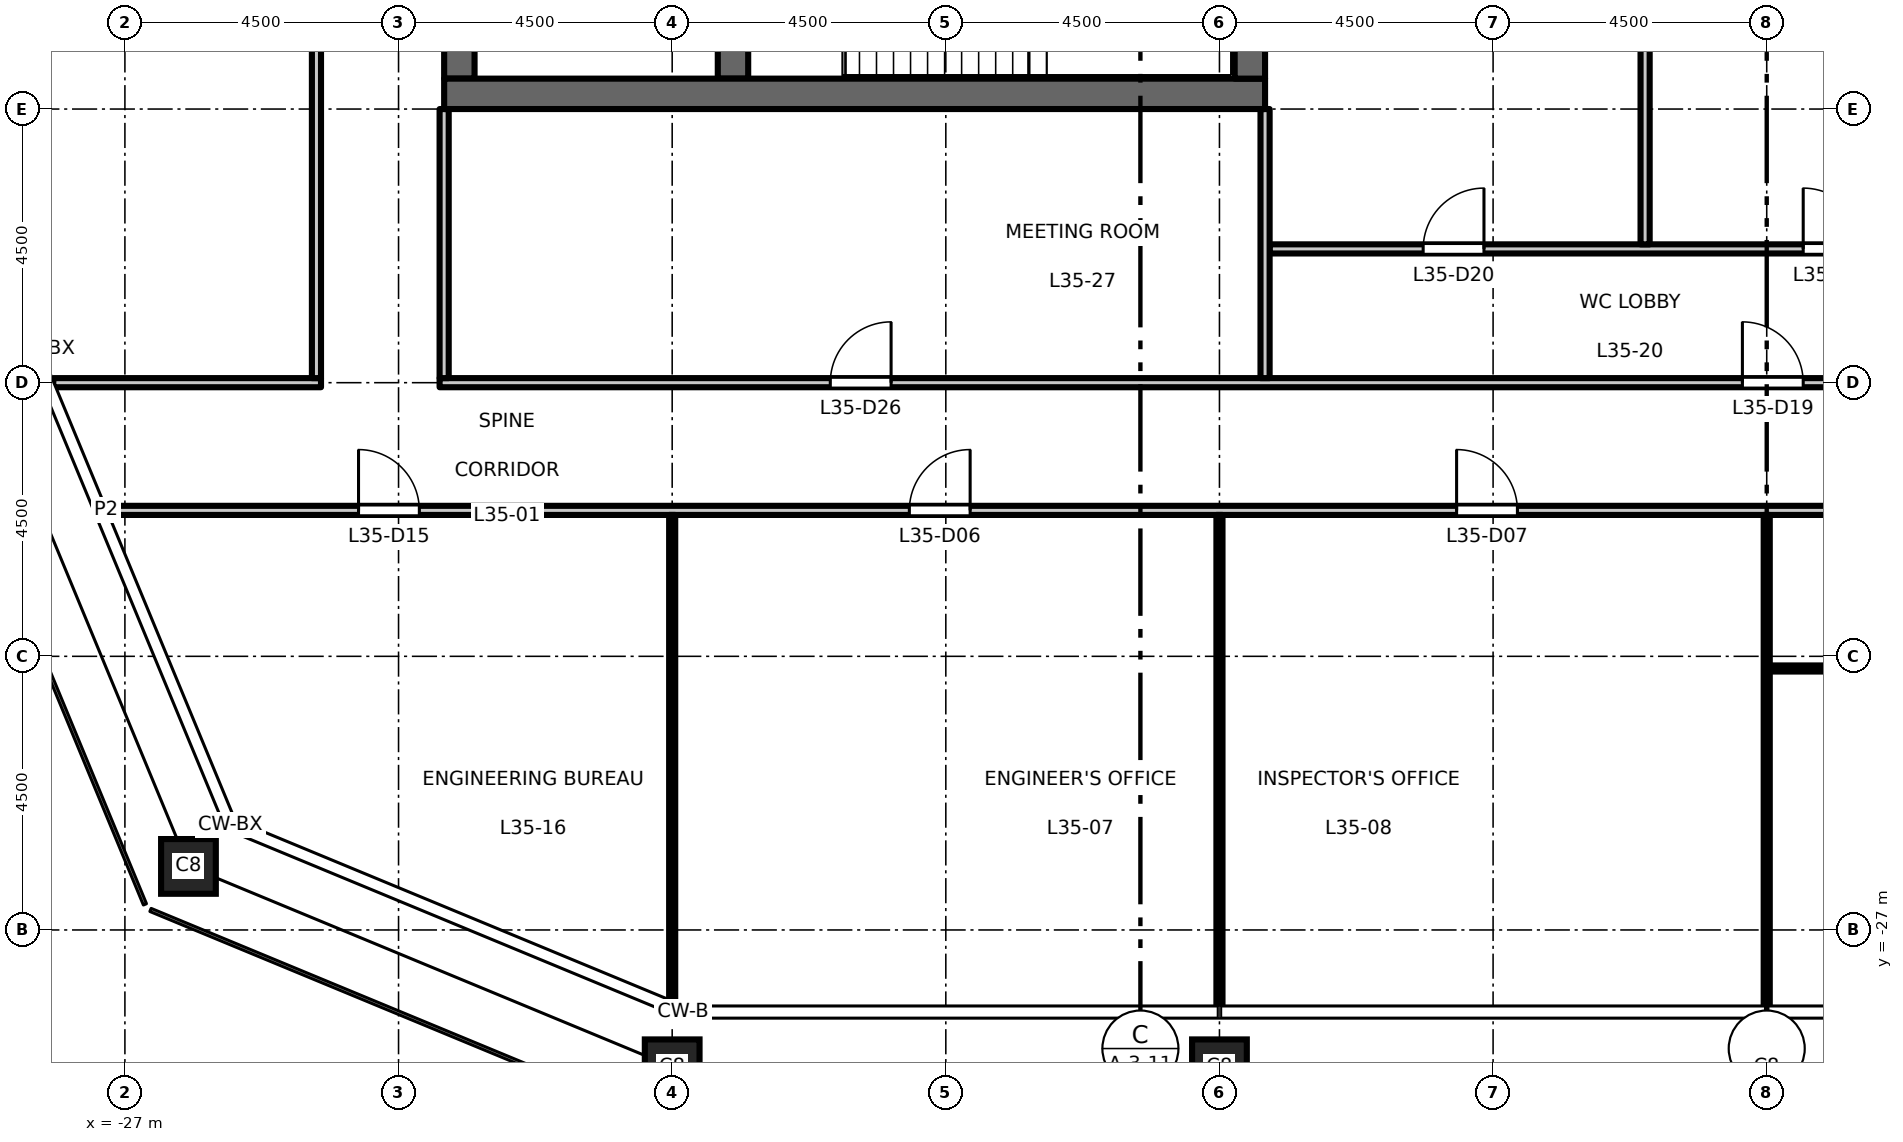
"""IFC4 building model, lengths in metres.
Left out: names, types, materials, properties, quantities, classifications, styles, units other than length and angle.
Written with IfcOpenShell. Run it as: python <this file> out.ifc"""

import sys

from ifc_helpers import new_model, si_unit, direction, frame, frame_2d, origin, origin_2d, place, context, subcontext, project, spatial, rectangle, hollow_rectangle, extrude, element, fill, save


model = new_model("IFC4")
c1 = context("Model", 3, precision=1e-05, world=origin(), true_north=direction((0.0, 1.0)))
c2 = subcontext(c1, "Body", "Model", "MODEL_VIEW")
j1 = project(units=[si_unit("LENGTHUNIT", "METRE"), si_unit("PLANEANGLEUNIT", "RADIAN")], contexts=[c1])
p1 = place(None, origin())
s1 = spatial("IfcSite", under=j1, at=p1, CompositionType="ELEMENT")
p2 = place(p1, origin())
s2 = spatial("IfcBuilding", under=s1, at=p2, CompositionType="ELEMENT")
p3 = place(p2, frame((0.0, 0.0, 163.2)))
s3 = spatial("IfcBuildingStorey", under=s2, at=p3, CompositionType="ELEMENT", Elevation=163.2)
for number, where, z_axis, x_axis in (
    (1, (-18.0, -29.25, 0.0), (0.0, 0.0, 1.0), (1.0, 0.0, 0.0)),
    (2, (-9.0, -29.25, 0.0), (0.0, 0.0, 1.0), (1.0, 0.0, 0.0)),
    (3, (0.0, -29.25, 0.0), (0.0, 0.0, 1.0), (1.0, 0.0, 0.0)),
    (4, (-25.955, -25.955, 0.0), (0.0, 0.0, 1.0), (1.0, 0.0, 0.0)),
):
    element("IfcColumn", number, at=place(p3, frame(where, z_axis=z_axis, x_axis=x_axis)), inside=s3, PredefinedType="COLUMN", context=c2, shape_type="SweptSolid", body=[
        extrude(hollow_rectangle(XDim=0.9, YDim=0.9, WallThickness=0.05, at=origin_2d()), origin(), (0.0, 0.0, 1.0), 4.5),
    ])
p4 = place(p3, frame((-21.5, -13.0, 0.0), z_axis=(0.0, 0.0, 1.0), x_axis=(0.0, 1.0, 0.0)))
e5 = element("IfcWall", 5, at=p4, inside=s3, PredefinedType="SHEAR", context=c2, shape_type="SweptSolid", body=[
    extrude(rectangle(XDim=26.0, YDim=0.5, at=frame_2d((13.0, 0.0))), origin(), (0.0, 0.0, 1.0), 4.35),
])
p5 = place(p4, frame((16.825, 0.0, 0.0)))
e6 = element("IfcOpeningElement", 6, at=p5, cuts=e5, PredefinedType="OPENING", context=c2, shape_type="SweptSolid", body=[
    extrude(rectangle(XDim=1.8, YDim=2.1, at=frame_2d((0.9, 1.05))), frame((0.0, 0.26, 0.0), z_axis=(0.0, -1.0, 0.0), x_axis=(1.0, 0.0, 0.0)), (0.0, 0.0, 1.0), 0.52),
])
p6 = place(p4, frame((7.375, 0.0, 0.0)))
e7 = element("IfcOpeningElement", 7, at=p6, cuts=e5, PredefinedType="OPENING", context=c2, shape_type="SweptSolid", body=[
    extrude(rectangle(XDim=1.8, YDim=2.1, at=frame_2d((0.9, 1.05))), frame((0.0, 0.26, 0.0), z_axis=(0.0, -1.0, 0.0), x_axis=(1.0, 0.0, 0.0)), (0.0, 0.0, 1.0), 0.52),
])
p7 = place(p4, frame((2.65, 0.0, 0.0)))
e8 = element("IfcOpeningElement", 8, at=p7, cuts=e5, PredefinedType="OPENING", context=c2, shape_type="SweptSolid", body=[
    extrude(rectangle(XDim=0.9, YDim=2.1, at=frame_2d((0.45, 1.05))), frame((0.0, 0.26, 0.0), z_axis=(0.0, -1.0, 0.0), x_axis=(1.0, 0.0, 0.0)), (0.0, 0.0, 1.0), 0.52),
])
p8 = place(p3, frame((-17.0, -13.0, 0.0), z_axis=(0.0, 0.0, 1.0), x_axis=(0.0, 1.0, 0.0)))
e9 = element("IfcWall", 9, at=p8, inside=s3, PredefinedType="SHEAR", context=c2, shape_type="SweptSolid", body=[
    extrude(rectangle(XDim=6.575, YDim=0.5, at=frame_2d((3.288, 0.0))), origin(), (0.0, 0.0, 1.0), 4.35),
])
p9 = place(p3, frame((-8.25, -13.25, 0.0), z_axis=(0.0, 0.0, 1.0), x_axis=(-1.0, 0.0, 0.0)))
e10 = element("IfcWall", 10, at=p9, inside=s3, PredefinedType="SHEAR", context=c2, shape_type="SweptSolid", body=[
    extrude(rectangle(XDim=13.5, YDim=0.5, at=frame_2d((6.75, 0.0))), origin(), (0.0, 0.0, 1.0), 4.35),
])
p10 = place(p3, frame((-8.5, -13.0, 0.0), z_axis=(0.0, 0.0, 1.0), x_axis=(0.0, 1.0, 0.0)))
e11 = element("IfcWall", 11, at=p10, inside=s3, PredefinedType="SHEAR", context=c2, shape_type="SweptSolid", body=[
    extrude(rectangle(XDim=26.0, YDim=0.5, at=frame_2d((13.0, 0.0))), origin(), (0.0, 0.0, 1.0), 4.35),
])
p11 = place(p3, frame((0.05, -22.7, 0.0), z_axis=(0.0, 0.0, 1.0), x_axis=(1.0, 0.0, 0.0)))
e12 = element("IfcWall", 12, at=p11, inside=s3, PredefinedType="PARTITIONING", context=c2, shape_type="SweptSolid", body=[
    extrude(rectangle(XDim=8.9, YDim=0.1, at=frame_2d((4.45, 0.0))), origin(), (0.0, 0.0, 1.0), 4.35),
])
p12 = place(p11, frame((3.85, 0.0, 0.0)))
e13 = element("IfcOpeningElement", 13, at=p12, cuts=e12, PredefinedType="OPENING", context=c2, shape_type="SweptSolid", body=[
    extrude(rectangle(XDim=1.0, YDim=2.1, at=frame_2d((0.5, 1.05))), frame((0.0, 0.06, 0.0), z_axis=(0.0, -1.0, 0.0), x_axis=(1.0, 0.0, 0.0)), (0.0, 0.0, 1.0), 0.12),
])
p13 = place(p3, frame((-27.308, -20.1, 0.0), z_axis=(0.0, 0.0, 1.0), x_axis=(1.0, 0.0, 0.0)))
e14 = element("IfcWall", 14, at=p13, inside=s3, PredefinedType="PARTITIONING", context=c2, shape_type="SweptSolid", body=[
    extrude(rectangle(XDim=54.616, YDim=0.15, at=frame_2d((27.308, 0.0))), origin(), (0.0, 0.0, 1.0), 4.35),
])
p14 = place(p13, frame((13.208, 0.0, 0.0)))
e15 = element("IfcOpeningElement", 15, at=p14, cuts=e14, PredefinedType="OPENING", context=c2, shape_type="SweptSolid", body=[
    extrude(rectangle(XDim=1.0, YDim=2.1, at=frame_2d((0.5, 1.05))), frame((0.0, 0.085, 0.0), z_axis=(0.0, -1.0, 0.0), x_axis=(1.0, 0.0, 0.0)), (0.0, 0.0, 1.0), 0.17),
])
p15 = place(p13, frame((22.208, 0.0, 0.0)))
e16 = element("IfcOpeningElement", 16, at=p15, cuts=e14, PredefinedType="OPENING", context=c2, shape_type="SweptSolid", body=[
    extrude(rectangle(XDim=1.0, YDim=2.1, at=frame_2d((0.5, 1.05))), frame((0.0, 0.085, 0.0), z_axis=(0.0, -1.0, 0.0), x_axis=(1.0, 0.0, 0.0)), (0.0, 0.0, 1.0), 0.17),
])
p16 = place(p13, frame((31.208, 0.0, 0.0)))
e17 = element("IfcOpeningElement", 17, at=p16, cuts=e14, PredefinedType="OPENING", context=c2, shape_type="SweptSolid", body=[
    extrude(rectangle(XDim=1.0, YDim=2.1, at=frame_2d((0.5, 1.05))), frame((0.0, 0.085, 0.0), z_axis=(0.0, -1.0, 0.0), x_axis=(1.0, 0.0, 0.0)), (0.0, 0.0, 1.0), 0.17),
])
p17 = place(p13, frame((40.208, 0.0, 0.0)))
e18 = element("IfcOpeningElement", 18, at=p17, cuts=e14, PredefinedType="OPENING", context=c2, shape_type="SweptSolid", body=[
    extrude(rectangle(XDim=1.0, YDim=2.1, at=frame_2d((0.5, 1.05))), frame((0.0, 0.085, 0.0), z_axis=(0.0, -1.0, 0.0), x_axis=(1.0, 0.0, 0.0)), (0.0, 0.0, 1.0), 0.17),
])
p18 = place(p13, frame((4.15, 0.0, 0.0)))
e19 = element("IfcOpeningElement", 19, at=p18, cuts=e14, PredefinedType="OPENING", context=c2, shape_type="SweptSolid", body=[
    extrude(rectangle(XDim=1.0, YDim=2.1, at=frame_2d((0.5, 1.05))), frame((0.0, 0.085, 0.0), z_axis=(0.0, -1.0, 0.0), x_axis=(1.0, 0.0, 0.0)), (0.0, 0.0, 1.0), 0.17),
])
p19 = place(p13, frame((49.458, 0.0, 0.0)))
e20 = element("IfcOpeningElement", 20, at=p19, cuts=e14, PredefinedType="OPENING", context=c2, shape_type="SweptSolid", body=[
    extrude(rectangle(XDim=1.0, YDim=2.1, at=frame_2d((0.5, 1.05))), frame((0.0, 0.085, 0.0), z_axis=(0.0, -1.0, 0.0), x_axis=(1.0, 0.0, 0.0)), (0.0, 0.0, 1.0), 0.17),
])
p20 = place(p3, frame((-28.178, -18.0, 0.0), z_axis=(0.0, 0.0, 1.0), x_axis=(1.0, 0.0, 0.0)))
e21 = element("IfcWall", 21, at=p20, inside=s3, PredefinedType="PARTITIONING", context=c2, shape_type="SweptSolid", body=[
    extrude(rectangle(XDim=4.403, YDim=0.15, at=frame_2d((2.202, 0.0))), origin(), (0.0, 0.0, 1.0), 4.35),
])
p21 = place(p3, frame((-21.825, -18.0, 0.0), z_axis=(0.0, 0.0, 1.0), x_axis=(1.0, 0.0, 0.0)))
e22 = element("IfcWall", 22, at=p21, inside=s3, PredefinedType="PARTITIONING", context=c2, shape_type="SweptSolid", body=[
    extrude(rectangle(XDim=43.65, YDim=0.15, at=frame_2d((21.825, 0.0))), origin(), (0.0, 0.0, 1.0), 4.35),
])
p22 = place(p21, frame((21.425, 0.0, 0.0)))
e23 = element("IfcOpeningElement", 23, at=p22, cuts=e22, PredefinedType="OPENING", context=c2, shape_type="SweptSolid", body=[
    extrude(rectangle(XDim=1.0, YDim=2.1, at=frame_2d((0.5, 1.05))), frame((0.0, 0.085, 0.0), z_axis=(0.0, -1.0, 0.0), x_axis=(1.0, 0.0, 0.0)), (0.0, 0.0, 1.0), 0.17),
])
p23 = place(p21, frame((6.425, 0.0, 0.0)))
e24 = element("IfcOpeningElement", 24, at=p23, cuts=e22, PredefinedType="OPENING", context=c2, shape_type="SweptSolid", body=[
    extrude(rectangle(XDim=1.0, YDim=2.1, at=frame_2d((0.5, 1.05))), frame((0.0, 0.085, 0.0), z_axis=(0.0, -1.0, 0.0), x_axis=(1.0, 0.0, 0.0)), (0.0, 0.0, 1.0), 0.17),
])
p24 = place(p21, frame((36.425, 0.0, 0.0)))
e25 = element("IfcOpeningElement", 25, at=p24, cuts=e22, PredefinedType="OPENING", context=c2, shape_type="SweptSolid", body=[
    extrude(rectangle(XDim=1.0, YDim=2.1, at=frame_2d((0.5, 1.05))), frame((0.0, 0.085, 0.0), z_axis=(0.0, -1.0, 0.0), x_axis=(1.0, 0.0, 0.0)), (0.0, 0.0, 1.0), 0.17),
])
p25 = place(p3, frame((-8.175, -15.8, 0.0), z_axis=(0.0, 0.0, 1.0), x_axis=(1.0, 0.0, 0.0)))
e26 = element("IfcWall", 26, at=p25, inside=s3, PredefinedType="PARTITIONING", context=c2, shape_type="SweptSolid", body=[
    extrude(rectangle(XDim=14.975, YDim=0.15, at=frame_2d((7.488, 0.0))), origin(), (0.0, 0.0, 1.0), 4.35),
])
p26 = place(p25, frame((2.525, 0.0, 0.0)))
e27 = element("IfcOpeningElement", 27, at=p26, cuts=e26, PredefinedType="OPENING", context=c2, shape_type="SweptSolid", body=[
    extrude(rectangle(XDim=1.0, YDim=2.1, at=frame_2d((0.5, 1.05))), frame((0.0, 0.085, 0.0), z_axis=(0.0, -1.0, 0.0), x_axis=(1.0, 0.0, 0.0)), (0.0, 0.0, 1.0), 0.17),
])
p27 = place(p25, frame((8.775, 0.0, 0.0)))
e28 = element("IfcOpeningElement", 28, at=p27, cuts=e26, PredefinedType="OPENING", context=c2, shape_type="SweptSolid", body=[
    extrude(rectangle(XDim=1.0, YDim=2.1, at=frame_2d((0.5, 1.05))), frame((0.0, 0.085, 0.0), z_axis=(0.0, -1.0, 0.0), x_axis=(1.0, 0.0, 0.0)), (0.0, 0.0, 1.0), 0.17),
])
p28 = place(p25, frame((13.325, 0.0, 0.0)))
e29 = element("IfcOpeningElement", 29, at=p28, cuts=e26, PredefinedType="OPENING", context=c2, shape_type="SweptSolid", body=[
    extrude(rectangle(XDim=1.0, YDim=2.1, at=frame_2d((0.5, 1.05))), frame((0.0, 0.085, 0.0), z_axis=(0.0, -1.0, 0.0), x_axis=(1.0, 0.0, 0.0)), (0.0, 0.0, 1.0), 0.17),
])
p29 = place(p3, frame((-23.85, -17.925, 0.0), z_axis=(0.0, 0.0, 1.0), x_axis=(0.0, 1.0, 0.0)))
e30 = element("IfcWall", 30, at=p29, inside=s3, PredefinedType="PARTITIONING", context=c2, shape_type="SweptSolid", body=[
    extrude(rectangle(XDim=35.85, YDim=0.15, at=frame_2d((17.925, 0.0))), origin(), (0.0, 0.0, 1.0), 4.35),
])
p30 = place(p3, frame((-21.75, -17.925, 0.0), z_axis=(0.0, 0.0, 1.0), x_axis=(0.0, 1.0, 0.0)))
e31 = element("IfcWall", 31, at=p30, inside=s3, PredefinedType="PARTITIONING", context=c2, shape_type="SweptSolid", body=[
    extrude(rectangle(XDim=4.425, YDim=0.15, at=frame_2d((2.212, 0.0))), origin(), (0.0, 0.0, 1.0), 4.35),
])
p31 = place(p3, frame((-18.0, -28.178, 0.0), z_axis=(0.0, 0.0, 1.0), x_axis=(0.0, 1.0, 0.0)))
e32 = element("IfcWall", 32, at=p31, inside=s3, PredefinedType="PARTITIONING", context=c2, shape_type="SweptSolid", body=[
    extrude(rectangle(XDim=8.003, YDim=0.1, at=frame_2d((4.001, 0.0))), origin(), (0.0, 0.0, 1.0), 3.45),
])
p32 = place(p3, frame((-9.0, -28.26, 0.0), z_axis=(0.0, 0.0, 1.0), x_axis=(0.0, 1.0, 0.0)))
e33 = element("IfcWall", 33, at=p32, inside=s3, PredefinedType="PARTITIONING", context=c2, shape_type="SweptSolid", body=[
    extrude(rectangle(XDim=8.085, YDim=0.1, at=frame_2d((4.042, 0.0))), origin(), (0.0, 0.0, 1.0), 3.45),
])
p33 = place(p3, frame((-8.25, -17.925, 0.0), z_axis=(0.0, 0.0, 1.0), x_axis=(0.0, 1.0, 0.0)))
e34 = element("IfcWall", 34, at=p33, inside=s3, PredefinedType="PARTITIONING", context=c2, shape_type="SweptSolid", body=[
    extrude(rectangle(XDim=4.425, YDim=0.15, at=frame_2d((2.212, 0.0))), origin(), (0.0, 0.0, 1.0), 4.35),
])
p34 = place(p3, frame((-2.0, -15.725, 0.0), z_axis=(0.0, 0.0, 1.0), x_axis=(0.0, 1.0, 0.0)))
e35 = element("IfcWall", 35, at=p34, inside=s3, PredefinedType="PARTITIONING", context=c2, shape_type="SweptSolid", body=[
    extrude(rectangle(XDim=7.355, YDim=0.15, at=frame_2d((3.677, 0.0))), origin(), (0.0, 0.0, 1.0), 4.35),
])
p35 = place(p3, frame((0.0, -28.26, 0.0), z_axis=(0.0, 0.0, 1.0), x_axis=(0.0, 1.0, 0.0)))
e36 = element("IfcWall", 36, at=p35, inside=s3, PredefinedType="PARTITIONING", context=c2, shape_type="SweptSolid", body=[
    extrude(rectangle(XDim=8.085, YDim=0.1, at=frame_2d((4.042, 0.0))), origin(), (0.0, 0.0, 1.0), 3.45),
])
p36 = place(p14, origin())
e37 = element("IfcDoor", 37, at=p36, inside=s3, OperationType="SINGLE_SWING_RIGHT", PredefinedType="DOOR", context=c2, shape_type="SweptSolid", body=[
    extrude(rectangle(XDim=1.0, YDim=2.1, at=frame_2d((0.5, 1.05))), frame((0.0, 0.025, 0.0), z_axis=(0.0, -1.0, 0.0), x_axis=(1.0, 0.0, 0.0)), (0.0, 0.0, 1.0), 0.05),
])
fill(e15, e37)
p37 = place(p15, origin())
e38 = element("IfcDoor", 38, at=p37, inside=s3, OperationType="SINGLE_SWING_LEFT", PredefinedType="DOOR", context=c2, shape_type="SweptSolid", body=[
    extrude(rectangle(XDim=1.0, YDim=2.1, at=frame_2d((0.5, 1.05))), frame((0.0, 0.025, 0.0), z_axis=(0.0, -1.0, 0.0), x_axis=(1.0, 0.0, 0.0)), (0.0, 0.0, 1.0), 0.05),
])
fill(e16, e38)
p38 = place(p18, origin())
e39 = element("IfcDoor", 39, at=p38, inside=s3, OperationType="SINGLE_SWING_LEFT", PredefinedType="DOOR", context=c2, shape_type="SweptSolid", body=[
    extrude(rectangle(XDim=1.0, YDim=2.1, at=frame_2d((0.5, 1.05))), frame((0.0, 0.025, 0.0), z_axis=(0.0, -1.0, 0.0), x_axis=(1.0, 0.0, 0.0)), (0.0, 0.0, 1.0), 0.05),
])
fill(e19, e39)
p39 = place(p22, origin())
e40 = element("IfcDoor", 40, at=p39, inside=s3, OperationType="SINGLE_SWING_LEFT", PredefinedType="DOOR", context=c2, shape_type="SweptSolid", body=[
    extrude(rectangle(XDim=1.0, YDim=2.1, at=frame_2d((0.5, 1.05))), frame((0.0, 0.025, 0.0), z_axis=(0.0, -1.0, 0.0), x_axis=(1.0, 0.0, 0.0)), (0.0, 0.0, 1.0), 0.05),
])
fill(e23, e40)
p40 = place(p26, origin())
e41 = element("IfcDoor", 41, at=p40, inside=s3, OperationType="SINGLE_SWING_RIGHT", PredefinedType="DOOR", context=c2, shape_type="SweptSolid", body=[
    extrude(rectangle(XDim=1.0, YDim=2.1, at=frame_2d((0.5, 1.05))), frame((0.0, 0.025, 0.0), z_axis=(0.0, -1.0, 0.0), x_axis=(1.0, 0.0, 0.0)), (0.0, 0.0, 1.0), 0.05),
])
fill(e27, e41)
p41 = place(p27, origin())
e42 = element("IfcDoor", 42, at=p41, inside=s3, OperationType="SINGLE_SWING_LEFT", PredefinedType="DOOR", context=c2, shape_type="SweptSolid", body=[
    extrude(rectangle(XDim=1.0, YDim=2.1, at=frame_2d((0.5, 1.05))), frame((0.0, 0.025, 0.0), z_axis=(0.0, -1.0, 0.0), x_axis=(1.0, 0.0, 0.0)), (0.0, 0.0, 1.0), 0.05),
])
fill(e28, e42)
p42 = place(p23, origin())
e43 = element("IfcDoor", 43, at=p42, inside=s3, OperationType="SINGLE_SWING_RIGHT", PredefinedType="DOOR", context=c2, shape_type="SweptSolid", body=[
    extrude(rectangle(XDim=1.0, YDim=2.1, at=frame_2d((0.5, 1.05))), frame((0.0, 0.025, 0.0), z_axis=(0.0, -1.0, 0.0), x_axis=(1.0, 0.0, 0.0)), (0.0, 0.0, 1.0), 0.05),
])
fill(e24, e43)
save(model, sys.argv[1])
